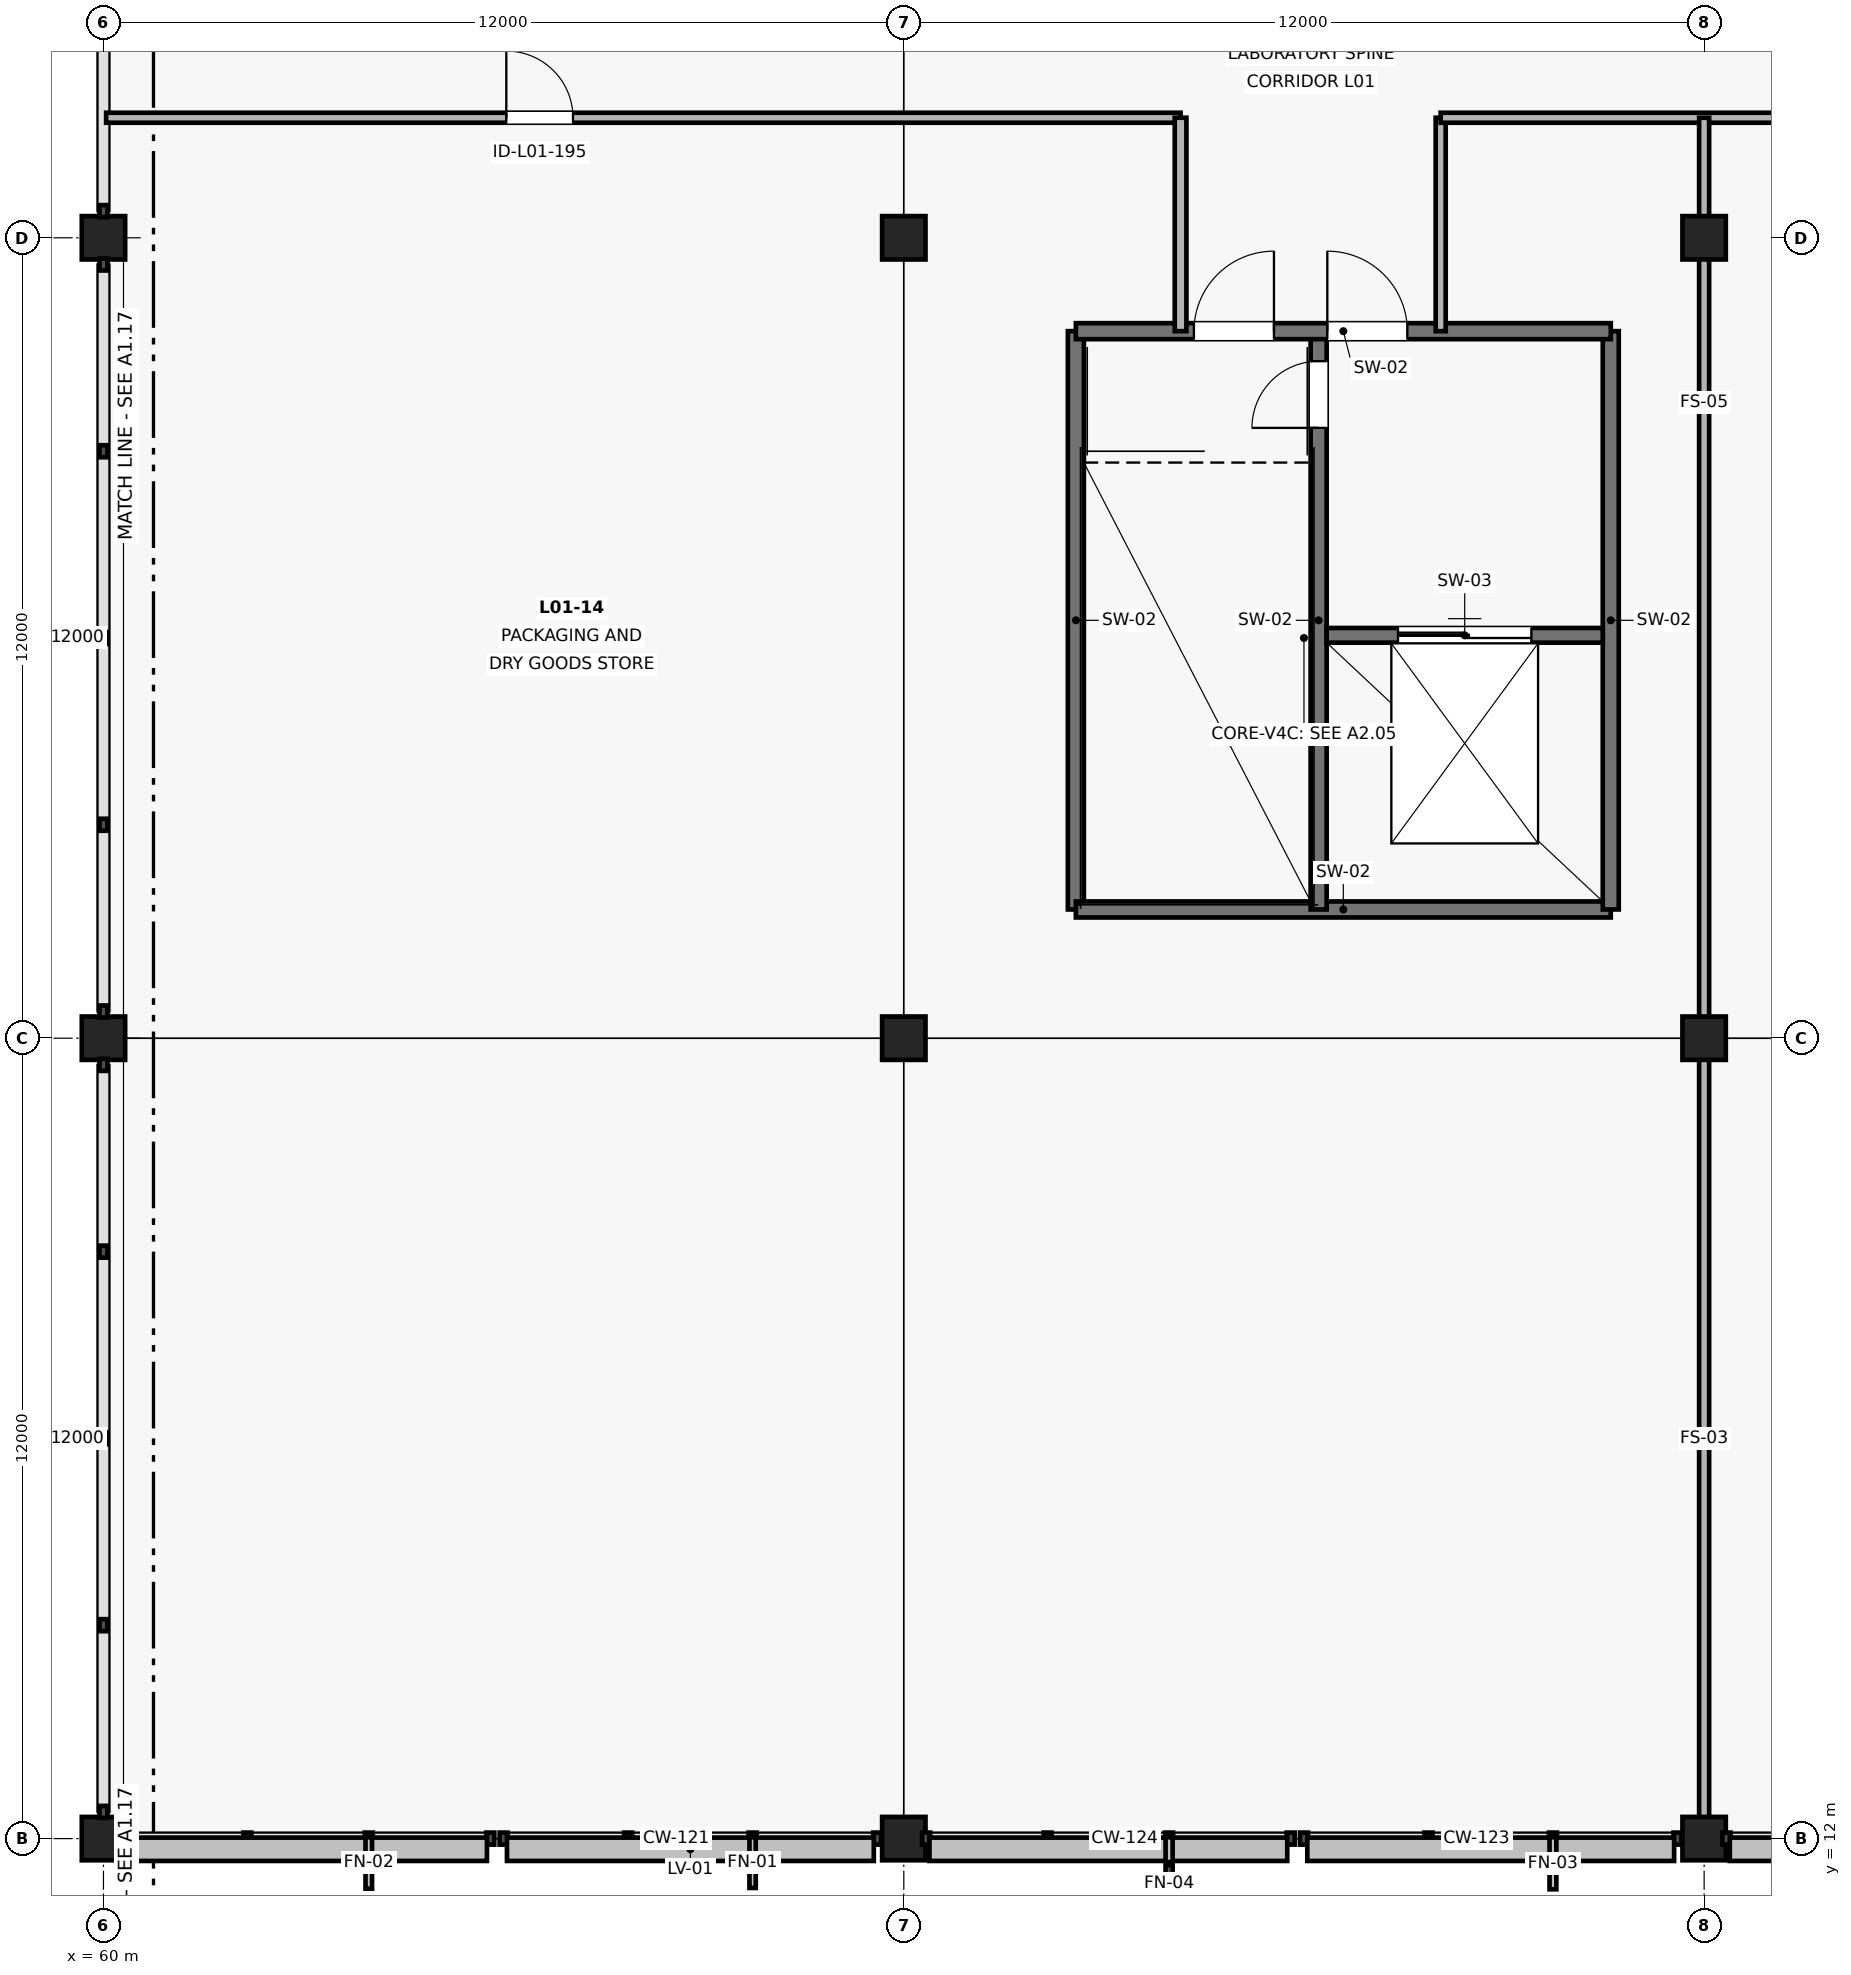
"""IFC4 building model, lengths in metres.
Left out: names, types, materials, properties, quantities, classifications, styles, units other than length and angle.
Written with IfcOpenShell. Run it as: python <this file> out.ifc"""

import sys

from ifc_helpers import new_model, si_unit, direction, frame, frame_2d, origin, origin_2d, place, context, subcontext, project, spatial, rectangle, extrude, element, fill, save


model = new_model("IFC4")
c1 = context("Model", 3, precision=1e-05, world=origin(), true_north=direction((0.0, 1.0)))
c2 = subcontext(c1, "Body", "Model", "MODEL_VIEW")
j1 = project(units=[si_unit("LENGTHUNIT", "METRE"), si_unit("PLANEANGLEUNIT", "RADIAN")], contexts=[c1])
p1 = place(None, origin())
s1 = spatial("IfcSite", under=j1, at=p1, CompositionType="ELEMENT")
p2 = place(p1, origin())
s2 = spatial("IfcBuilding", under=s1, at=p2, CompositionType="ELEMENT")
p3 = place(p2, frame((0.0, 0.0, 6.6)))
s3 = spatial("IfcBuildingStorey", under=s2, at=p3, CompositionType="ELEMENT", Elevation=6.6)
for number, where, z_axis, x_axis in (
    (1, (60.0, 12.0, 0.0), (0.0, 0.0, 1.0), (1.0, 0.0, 0.0)),
    (2, (60.0, 24.0, 0.0), (0.0, 0.0, 1.0), (1.0, 0.0, 0.0)),
    (3, (60.0, 36.0, 0.0), (0.0, 0.0, 1.0), (1.0, 0.0, 0.0)),
    (4, (72.0, 12.0, 0.0), (0.0, 0.0, 1.0), (1.0, 0.0, 0.0)),
    (5, (72.0, 24.0, 0.0), (0.0, 0.0, 1.0), (1.0, 0.0, 0.0)),
    (6, (72.0, 36.0, 0.0), (0.0, 0.0, 1.0), (1.0, 0.0, 0.0)),
    (7, (84.0, 12.0, 0.0), (0.0, 0.0, 1.0), (1.0, 0.0, 0.0)),
    (8, (84.0, 24.0, 0.0), (0.0, 0.0, 1.0), (1.0, 0.0, 0.0)),
    (9, (84.0, 36.0, 0.0), (0.0, 0.0, 1.0), (1.0, 0.0, 0.0)),
):
    element("IfcColumn", number, at=place(p3, frame(where, z_axis=z_axis, x_axis=x_axis)), inside=s3, PredefinedType="COLUMN", context=c2, shape_type="SweptSolid", body=[
        extrude(rectangle(XDim=0.65, YDim=0.65, at=origin_2d()), origin(), (0.0, 0.0, 1.0), 5.2),
    ])
p4 = place(p3, frame((74.58, 34.6, 0.0), z_axis=(0.0, 0.0, 1.0), x_axis=(0.0, -1.0, 0.0)))
e10 = element("IfcWall", 10, at=p4, inside=s3, PredefinedType="SHEAR", context=c2, shape_type="SweptSolid", body=[
    extrude(rectangle(XDim=8.67, YDim=0.24, at=frame_2d((4.335, 0.0))), origin(), (0.0, 0.0, 1.0), 4.59),
])
p5 = place(p3, frame((74.58, 25.93, 0.0), z_axis=(0.0, 0.0, 1.0), x_axis=(1.0, 0.0, 0.0)))
e11 = element("IfcWall", 11, at=p5, inside=s3, PredefinedType="SHEAR", context=c2, shape_type="SweptSolid", body=[
    extrude(rectangle(XDim=8.02, YDim=0.24, at=frame_2d((4.01, 0.0))), origin(), (0.0, 0.0, 1.0), 4.59),
])
p6 = place(p3, frame((78.22, 25.93, 0.0), z_axis=(0.0, 0.0, 1.0), x_axis=(0.0, 1.0, 0.0)))
e12 = element("IfcWall", 12, at=p6, inside=s3, PredefinedType="SHEAR", context=c2, shape_type="SweptSolid", body=[
    extrude(rectangle(XDim=8.67, YDim=0.24, at=frame_2d((4.335, 0.0))), origin(), (0.0, 0.0, 1.0), 4.59),
])
p7 = place(p6, frame((7.22, 0.0, 0.0)))
e13 = element("IfcOpeningElement", 13, at=p7, cuts=e12, PredefinedType="OPENING", context=c2, shape_type="SweptSolid", body=[
    extrude(rectangle(XDim=1.0, YDim=2.2, at=frame_2d((0.5, 1.1))), frame((0.0, 0.135, 0.0), z_axis=(0.0, -1.0, 0.0), x_axis=(1.0, 0.0, 0.0)), (0.0, 0.0, 1.0), 0.27),
])
p8 = place(p3, frame((82.6, 25.93, 0.0), z_axis=(0.0, 0.0, 1.0), x_axis=(0.0, 1.0, 0.0)))
e14 = element("IfcWall", 14, at=p8, inside=s3, PredefinedType="SHEAR", context=c2, shape_type="SweptSolid", body=[
    extrude(rectangle(XDim=8.67, YDim=0.24, at=frame_2d((4.335, 0.0))), origin(), (0.0, 0.0, 1.0), 4.59),
])
p9 = place(p3, frame((74.58, 34.6, 0.0), z_axis=(0.0, 0.0, 1.0), x_axis=(1.0, 0.0, 0.0)))
e15 = element("IfcWall", 15, at=p9, inside=s3, PredefinedType="SHEAR", context=c2, shape_type="SweptSolid", body=[
    extrude(rectangle(XDim=8.02, YDim=0.24, at=frame_2d((4.01, 0.0))), origin(), (0.0, 0.0, 1.0), 4.59),
])
p10 = place(p9, frame((1.77, 0.0, 0.0)))
e16 = element("IfcOpeningElement", 16, at=p10, cuts=e15, PredefinedType="OPENING", context=c2, shape_type="SweptSolid", body=[
    extrude(rectangle(XDim=1.2, YDim=2.2, at=frame_2d((0.6, 1.1))), frame((0.0, 0.135, 0.0), z_axis=(0.0, -1.0, 0.0), x_axis=(1.0, 0.0, 0.0)), (0.0, 0.0, 1.0), 0.27),
])
p11 = place(p9, frame((3.77, 0.0, 0.0)))
e17 = element("IfcOpeningElement", 17, at=p11, cuts=e15, PredefinedType="OPENING", context=c2, shape_type="SweptSolid", body=[
    extrude(rectangle(XDim=1.2, YDim=2.2, at=frame_2d((0.6, 1.1))), frame((0.0, 0.135, 0.0), z_axis=(0.0, -1.0, 0.0), x_axis=(1.0, 0.0, 0.0)), (0.0, 0.0, 1.0), 0.27),
])
p12 = place(p3, frame((78.34, 30.04, 0.0), z_axis=(0.0, 0.0, 1.0), x_axis=(1.0, 0.0, 0.0)))
e18 = element("IfcWall", 18, at=p12, inside=s3, PredefinedType="SHEAR", context=c2, shape_type="SweptSolid", body=[
    extrude(rectangle(XDim=4.14, YDim=0.22, at=frame_2d((2.07, 0.0))), origin(), (0.0, 0.0, 1.0), 4.59),
])
p13 = place(p12, frame((1.07, 0.0, 0.0)))
e19 = element("IfcOpeningElement", 19, at=p13, cuts=e18, PredefinedType="OPENING", context=c2, shape_type="SweptSolid", body=[
    extrude(rectangle(XDim=2.0, YDim=2.4, at=frame_2d((1.0, 1.2))), frame((0.0, 0.125, 0.0), z_axis=(0.0, -1.0, 0.0), x_axis=(1.0, 0.0, 0.0)), (0.0, 0.0, 1.0), 0.25),
])
p14 = place(p3, frame((60.04, 37.8, 0.0), z_axis=(0.0, 0.0, 1.0), x_axis=(1.0, 0.0, 0.0)))
e20 = element("IfcWall", 20, at=p14, inside=s3, PredefinedType="PARTITIONING", context=c2, shape_type="SweptSolid", body=[
    extrude(rectangle(XDim=16.11, YDim=0.15, at=frame_2d((8.055, 0.0))), origin(), (0.0, 0.0, 1.0), 4.335),
])
p15 = place(p14, frame((6.0, 0.0, 0.0)))
e21 = element("IfcOpeningElement", 21, at=p15, cuts=e20, PredefinedType="OPENING", context=c2, shape_type="SweptSolid", body=[
    extrude(rectangle(XDim=1.0, YDim=2.2, at=frame_2d((0.5, 1.1))), frame((0.0, 0.09, 0.0), z_axis=(0.0, -1.0, 0.0), x_axis=(1.0, 0.0, 0.0)), (0.0, 0.0, 1.0), 0.18),
])
p16 = place(p3, frame((76.15, 34.6, 0.0), z_axis=(0.0, 0.0, 1.0), x_axis=(0.0, 1.0, 0.0)))
e22 = element("IfcWall", 22, at=p16, inside=s3, PredefinedType="PARTITIONING", context=c2, shape_type="SweptSolid", body=[
    extrude(rectangle(XDim=3.2, YDim=0.175, at=frame_2d((1.6, 0.0))), origin(), (0.0, 0.0, 1.0), 4.235),
])
p17 = place(p3, frame((80.05, 34.6, 0.0), z_axis=(0.0, 0.0, 1.0), x_axis=(0.0, 1.0, 0.0)))
e23 = element("IfcWall", 23, at=p17, inside=s3, PredefinedType="PARTITIONING", context=c2, shape_type="SweptSolid", body=[
    extrude(rectangle(XDim=3.2, YDim=0.15, at=frame_2d((1.6, 0.0))), origin(), (0.0, 0.0, 1.0), 4.235),
])
p18 = place(p3, frame((80.05, 37.8, 0.0), z_axis=(0.0, 0.0, 1.0), x_axis=(1.0, 0.0, 0.0)))
e24 = element("IfcWall", 24, at=p18, inside=s3, PredefinedType="PARTITIONING", context=c2, shape_type="SweptSolid", body=[
    extrude(rectangle(XDim=20.1, YDim=0.15, at=frame_2d((10.05, 0.0))), origin(), (0.0, 0.0, 1.0), 4.385),
])
p19 = place(p18, frame((6.5, 0.0, 0.0)))
e25 = element("IfcOpeningElement", 25, at=p19, cuts=e24, PredefinedType="OPENING", context=c2, shape_type="SweptSolid", body=[
    extrude(rectangle(XDim=0.9, YDim=2.1, at=frame_2d((0.45, 1.05))), frame((0.0, 0.09, 0.0), z_axis=(0.0, -1.0, 0.0), x_axis=(1.0, 0.0, 0.0)), (0.0, 0.0, 1.0), 0.18),
])
p20 = place(p18, frame((9.0, 0.0, 0.0)))
e26 = element("IfcOpeningElement", 26, at=p20, cuts=e24, PredefinedType="OPENING", context=c2, shape_type="SweptSolid", body=[
    extrude(rectangle(XDim=1.0, YDim=2.2, at=frame_2d((0.5, 1.1))), frame((0.0, 0.09, 0.0), z_axis=(0.0, -1.0, 0.0), x_axis=(1.0, 0.0, 0.0)), (0.0, 0.0, 1.0), 0.18),
])
p21 = place(p3, frame((84.0, 12.04, 0.0), z_axis=(0.0, 0.0, 1.0), x_axis=(0.0, 1.0, 0.0)))
e27 = element("IfcWall", 27, at=p21, inside=s3, PredefinedType="PARTITIONING", context=c2, shape_type="SweptSolid", body=[
    extrude(rectangle(XDim=25.76, YDim=0.15, at=frame_2d((12.88, 0.0))), origin(), (0.0, 0.0, 1.0), 3.935),
])
p22 = place(p10, origin())
e28 = element("IfcDoor", 28, at=p22, inside=s3, OperationType="SINGLE_SWING_RIGHT", PredefinedType="DOOR", context=c2, shape_type="SweptSolid", body=[
    extrude(rectangle(XDim=1.2, YDim=2.2, at=frame_2d((0.6, 1.1))), frame((0.0, 0.025, 0.0), z_axis=(0.0, -1.0, 0.0), x_axis=(1.0, 0.0, 0.0)), (0.0, 0.0, 1.0), 0.05),
])
fill(e16, e28)
p23 = place(p11, origin())
e29 = element("IfcDoor", 29, at=p23, inside=s3, OperationType="SINGLE_SWING_LEFT", PredefinedType="DOOR", context=c2, shape_type="SweptSolid", body=[
    extrude(rectangle(XDim=1.2, YDim=2.2, at=frame_2d((0.6, 1.1))), frame((0.0, 0.025, 0.0), z_axis=(0.0, -1.0, 0.0), x_axis=(1.0, 0.0, 0.0)), (0.0, 0.0, 1.0), 0.05),
])
fill(e17, e29)
p24 = place(p7, origin())
e30 = element("IfcDoor", 30, at=p24, inside=s3, OperationType="SINGLE_SWING_LEFT", PredefinedType="DOOR", context=c2, shape_type="SweptSolid", body=[
    extrude(rectangle(XDim=1.0, YDim=2.2, at=frame_2d((0.5, 1.1))), frame((0.0, 0.025, 0.0), z_axis=(0.0, -1.0, 0.0), x_axis=(1.0, 0.0, 0.0)), (0.0, 0.0, 1.0), 0.05),
])
fill(e13, e30)
p25 = place(p13, origin())
e31 = element("IfcDoor", 31, at=p25, inside=s3, OperationType="DOUBLE_DOOR_SLIDING", PredefinedType="DOOR", context=c2, shape_type="SweptSolid", body=[
    extrude(rectangle(XDim=2.0, YDim=2.4, at=frame_2d((1.0, 1.2))), frame((0.0, 0.025, 0.0), z_axis=(0.0, -1.0, 0.0), x_axis=(1.0, 0.0, 0.0)), (0.0, 0.0, 1.0), 0.05),
])
fill(e19, e31)
p26 = place(p15, origin())
e32 = element("IfcDoor", 32, at=p26, inside=s3, OperationType="SINGLE_SWING_LEFT", PredefinedType="DOOR", context=c2, shape_type="SweptSolid", body=[
    extrude(rectangle(XDim=1.0, YDim=2.2, at=frame_2d((0.5, 1.1))), frame((0.0, 0.025, 0.0), z_axis=(0.0, -1.0, 0.0), x_axis=(1.0, 0.0, 0.0)), (0.0, 0.0, 1.0), 0.05),
])
fill(e21, e32)
save(model, sys.argv[1])
